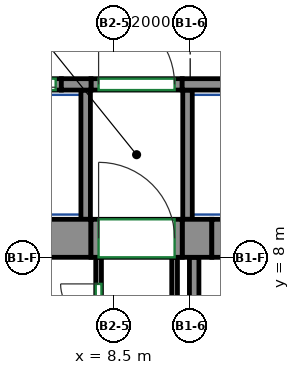
"""IFC4 building model, lengths in metres.
Left out: names, types, materials, properties, quantities, classifications, styles, units other than length and angle.
Written with IfcOpenShell. Run it as: python <this file> out.ifc"""

import sys

from ifc_helpers import new_model, si_unit, direction, frame, frame_2d, origin, place, context, subcontext, project, spatial, rectangle, extrude, source, transform, mapped, element, fill, save


model = new_model("IFC4")
c1 = context("Model", 3, precision=1e-05, world=origin(), true_north=direction((0.0, 1.0)))
c2 = subcontext(c1, "Body", "Model", "MODEL_VIEW")
j1 = project(units=[si_unit("LENGTHUNIT", "METRE"), si_unit("PLANEANGLEUNIT", "RADIAN")], contexts=[c1])
p1 = place(None, origin())
s1 = spatial("IfcSite", under=j1, at=p1, CompositionType="ELEMENT")
p2 = place(p1, origin())
s2 = spatial("IfcBuilding", under=s1, at=p2, CompositionType="ELEMENT")
p3 = place(p2, frame((0.0, 0.0, 43.0)))
s3 = spatial("IfcBuildingStorey", under=s2, at=p3, CompositionType="ELEMENT", Elevation=43.0)
m1 = source(origin(), c2, "Body", "SweptSolid", [
    extrude(rectangle(XDim=14.18, YDim=1.0, at=frame_2d((7.09, 0.0))), origin(), (0.0, 0.0, 1.0), 3.72),
])
p4 = place(p3, frame((-6.29, 8.5, 0.0), z_axis=(0.0, 0.0, 1.0), x_axis=(1.0, 0.0, 0.0)))
e1 = element("IfcWall", 1, at=p4, inside=s3, PredefinedType="SHEAR", context=c2, shape_type="MappedRepresentation", body=[
    mapped(m1, transform((0.0, 0.0, 0.0))),
])
m2 = source(origin(), c2, "Body", "SweptSolid", [
    extrude(rectangle(XDim=0.78, YDim=1.0, at=frame_2d((0.39, 0.0))), origin(), (0.0, 0.0, 1.0), 3.72),
])
p5 = place(p3, frame((10.29, 8.5, 0.0), z_axis=(0.0, 0.0, 1.0), x_axis=(1.0, 0.0, 0.0)))
e2 = element("IfcWall", 2, at=p5, inside=s3, PredefinedType="SHEAR", context=c2, shape_type="MappedRepresentation", body=[
    mapped(m2, transform((0.0, 0.0, 0.0))),
])
m3 = source(origin(), c2, "Body", "SweptSolid", [
    extrude(rectangle(XDim=0.78, YDim=0.3, at=frame_2d((0.39, 0.0))), origin(), (0.0, 0.0, 1.0), 3.72),
])
p6 = place(p3, frame((7.11, 12.55, 0.0), z_axis=(0.0, 0.0, 1.0), x_axis=(1.0, 0.0, 0.0)))
e3 = element("IfcWall", 3, at=p6, inside=s3, PredefinedType="SHEAR", context=c2, shape_type="MappedRepresentation", body=[
    mapped(m3, transform((0.0, 0.0, 0.0))),
])
m4 = source(origin(), c2, "Body", "SweptSolid", [
    extrude(rectangle(XDim=2.82, YDim=0.3, at=frame_2d((1.41, 0.0))), origin(), (0.0, 0.0, 1.0), 3.72),
])
p7 = place(p3, frame((10.29, 12.55, 0.0), z_axis=(0.0, 0.0, 1.0), x_axis=(1.0, 0.0, 0.0)))
e4 = element("IfcWall", 4, at=p7, inside=s3, PredefinedType="SHEAR", context=c2, shape_type="MappedRepresentation", body=[
    mapped(m4, transform((0.0, 0.0, 0.0))),
])
m5 = source(origin(), c2, "Body", "SweptSolid", [
    extrude(rectangle(XDim=1.4, YDim=0.3, at=frame_2d((0.7, 0.0))), origin(), (0.0, 0.0, 1.0), 3.72),
])
p8 = place(p3, frame((5.71, 12.55, 0.0), z_axis=(0.0, 0.0, 1.0), x_axis=(1.0, 0.0, 0.0)))
e5 = element("IfcWall", 5, at=p8, inside=s3, PredefinedType="PARTITIONING", context=c2, shape_type="MappedRepresentation", body=[
    mapped(m5, transform((0.0, 0.0, 0.0))),
])
p9 = place(p8, frame((0.15, 0.0, 0.0)))
e6 = element("IfcOpeningElement", 6, at=p9, cuts=e5, PredefinedType="OPENING", context=c2, shape_type="SweptSolid", body=[
    extrude(rectangle(XDim=1.1, YDim=2.1, at=frame_2d((0.55, 1.05))), frame((0.0, 0.16, 0.0), z_axis=(0.0, -1.0, 0.0), x_axis=(1.0, 0.0, 0.0)), (0.0, 0.0, 1.0), 0.32),
])
m6 = source(origin(), c2, "Body", "SweptSolid", [
    extrude(rectangle(XDim=2.4, YDim=0.3, at=frame_2d((1.2, 0.0))), origin(), (0.0, 0.0, 1.0), 3.72),
])
p10 = place(p3, frame((7.89, 12.55, 0.0), z_axis=(0.0, 0.0, 1.0), x_axis=(1.0, 0.0, 0.0)))
e7 = element("IfcWall", 7, at=p10, inside=s3, PredefinedType="PARTITIONING", context=c2, shape_type="MappedRepresentation", body=[
    mapped(m6, transform((0.0, 0.0, 0.0))),
])
p11 = place(p10, frame((0.2, 0.0, 0.0)))
e8 = element("IfcOpeningElement", 8, at=p11, cuts=e7, PredefinedType="OPENING", context=c2, shape_type="SweptSolid", body=[
    extrude(rectangle(XDim=2.0, YDim=2.1, at=frame_2d((1.0, 1.05))), frame((0.0, 0.16, 0.0), z_axis=(0.0, -1.0, 0.0), x_axis=(1.0, 0.0, 0.0)), (0.0, 0.0, 1.0), 0.32),
])
m7 = source(origin(), c2, "Body", "SweptSolid", [
    extrude(rectangle(XDim=2.65, YDim=0.25, at=frame_2d((1.325, 0.0))), origin(), (0.0, 0.0, 1.0), 3.72),
])
p12 = place(p3, frame((10.605, 5.35, 0.0), z_axis=(0.0, 0.0, 1.0), x_axis=(0.0, 1.0, 0.0)))
e9 = element("IfcWall", 9, at=p12, inside=s3, PredefinedType="PARTITIONING", context=c2, shape_type="MappedRepresentation", body=[
    mapped(m7, transform((0.0, 0.0, 0.0))),
])
m8 = source(origin(), c2, "Body", "SweptSolid", [
    extrude(rectangle(XDim=3.4, YDim=0.25, at=frame_2d((1.7, 0.0))), origin(), (0.0, 0.0, 1.0), 3.72),
])
for number, where, z_axis, x_axis in (
    (10, (10.43, 9.0, 0.0), (0.0, 0.0, 1.0), (0.0, 1.0, 0.0)),
    (11, (7.75, 9.0, 0.0), (0.0, 0.0, 1.0), (0.0, 1.0, 0.0)),
):
    element("IfcWall", number, at=place(p3, frame(where, z_axis=z_axis, x_axis=x_axis)), inside=s3, PredefinedType="PARTITIONING", context=c2, shape_type="MappedRepresentation", body=[
        mapped(m8, transform((0.0, 0.0, 0.0))),
    ])
m9 = source(origin(), c2, "Body", "SweptSolid", [
    extrude(rectangle(XDim=2.4, YDim=1.0, at=frame_2d((1.2, 0.0))), origin(), (0.0, 0.0, 1.0), 2.7),
])
p13 = place(p3, frame((7.89, 8.5, 0.0), z_axis=(0.0, 0.0, 1.0), x_axis=(1.0, 0.0, 0.0)))
e12 = element("IfcWall", 12, at=p13, inside=s3, PredefinedType="PARTITIONING", context=c2, shape_type="MappedRepresentation", body=[
    mapped(m9, transform((0.0, 0.0, 0.0))),
])
p14 = place(p13, frame((0.2, 0.0, 0.0)))
e13 = element("IfcOpeningElement", 13, at=p14, cuts=e12, PredefinedType="OPENING", context=c2, shape_type="SweptSolid", body=[
    extrude(rectangle(XDim=2.0, YDim=2.1, at=frame_2d((1.0, 1.05))), frame((0.0, 0.51, 0.0), z_axis=(0.0, -1.0, 0.0), x_axis=(1.0, 0.0, 0.0)), (0.0, 0.0, 1.0), 1.02),
])
m10 = source(origin(), c2, "Body", "SweptSolid", [
    extrude(rectangle(XDim=1.4, YDim=1.0, at=frame_2d((0.7, 0.0))), origin(), (0.0, 0.0, 1.0), 2.7),
])
p15 = place(p3, frame((11.07, 8.5, 0.0), z_axis=(0.0, 0.0, 1.0), x_axis=(1.0, 0.0, 0.0)))
e14 = element("IfcWall", 14, at=p15, inside=s3, PredefinedType="PARTITIONING", context=c2, shape_type="MappedRepresentation", body=[
    mapped(m10, transform((0.0, 0.0, 0.0))),
])
p16 = place(p15, frame((0.25, 0.0, 0.0)))
e15 = element("IfcOpeningElement", 15, at=p16, cuts=e14, PredefinedType="OPENING", context=c2, shape_type="SweptSolid", body=[
    extrude(rectangle(XDim=0.9, YDim=2.1, at=frame_2d((0.45, 1.05))), frame((0.0, 0.51, 0.0), z_axis=(0.0, -1.0, 0.0), x_axis=(1.0, 0.0, 0.0)), (0.0, 0.0, 1.0), 1.02),
])
p17 = place(p3, frame((10.09, -0.35, 0.0), z_axis=(0.0, 0.0, 1.0), x_axis=(0.0, 1.0, 0.0)))
e16 = element("IfcWall", 16, at=p17, inside=s3, PredefinedType="PARTITIONING", context=c2, shape_type="SweptSolid", body=[
    extrude(rectangle(XDim=8.35, YDim=0.15, at=frame_2d((4.175, 0.0))), origin(), (0.0, 0.0, 1.0), 3.72),
])
p18 = place(p17, frame((4.329, 0.0, 0.0)))
e17 = element("IfcOpeningElement", 17, at=p18, cuts=e16, PredefinedType="OPENING", context=c2, shape_type="SweptSolid", body=[
    extrude(rectangle(XDim=0.9, YDim=2.1, at=frame_2d((0.45, 1.05))), frame((0.0, 0.085, 0.0), z_axis=(0.0, -1.0, 0.0), x_axis=(1.0, 0.0, 0.0)), (0.0, 0.0, 1.0), 0.17),
])
p19 = place(p3, frame((8.09, 5.75, 0.0), z_axis=(0.0, 0.0, 1.0), x_axis=(0.0, 1.0, 0.0)))
e18 = element("IfcWall", 18, at=p19, inside=s3, PredefinedType="PARTITIONING", context=c2, shape_type="SweptSolid", body=[
    extrude(rectangle(XDim=2.25, YDim=0.15, at=frame_2d((1.125, 0.0))), origin(), (0.0, 0.0, 1.0), 3.72),
])
p20 = place(p19, frame((0.55, 0.0, 0.0)))
e19 = element("IfcOpeningElement", 19, at=p20, cuts=e18, PredefinedType="OPENING", context=c2, shape_type="SweptSolid", body=[
    extrude(rectangle(XDim=1.0, YDim=2.1, at=frame_2d((0.5, 1.05))), frame((0.0, 0.085, 0.0), z_axis=(0.0, -1.0, 0.0), x_axis=(1.0, 0.0, 0.0)), (0.0, 0.0, 1.0), 0.17),
])
p21 = place(p11, origin())
e20 = element("IfcDoor", 20, at=p21, inside=s3, OperationType="DOUBLE_DOOR_SINGLE_SWING", PredefinedType="DOOR", context=c2, shape_type="SweptSolid", body=[
    extrude(rectangle(XDim=2.0, YDim=2.1, at=frame_2d((1.0, 1.05))), frame((0.0, 0.025, 0.0), z_axis=(0.0, -1.0, 0.0), x_axis=(1.0, 0.0, 0.0)), (0.0, 0.0, 1.0), 0.05),
])
fill(e8, e20)
p22 = place(p14, origin())
e21 = element("IfcDoor", 21, at=p22, inside=s3, OperationType="DOUBLE_DOOR_SINGLE_SWING", PredefinedType="DOOR", context=c2, shape_type="SweptSolid", body=[
    extrude(rectangle(XDim=2.0, YDim=2.1, at=frame_2d((1.0, 1.05))), frame((0.0, 0.405, 0.0), z_axis=(0.0, -1.0, 0.0), x_axis=(1.0, 0.0, 0.0)), (0.0, 0.0, 1.0), 0.05),
])
fill(e13, e21)
p23 = place(p9, origin())
e22 = element("IfcDoor", 22, at=p23, inside=s3, OperationType="DOUBLE_DOOR_SLIDING", PredefinedType="DOOR", context=c2, shape_type="SweptSolid", body=[
    extrude(rectangle(XDim=1.1, YDim=2.1, at=frame_2d((0.55, 1.05))), frame((0.0, 0.025, 0.0), z_axis=(0.0, -1.0, 0.0), x_axis=(1.0, 0.0, 0.0)), (0.0, 0.0, 1.0), 0.05),
])
fill(e6, e22)
p24 = place(p20, origin())
e23 = element("IfcDoor", 23, at=p24, inside=s3, OperationType="SINGLE_SWING_RIGHT", PredefinedType="DOOR", context=c2, shape_type="SweptSolid", body=[
    extrude(rectangle(XDim=1.0, YDim=2.1, at=frame_2d((0.5, 1.05))), frame((0.0, 0.025, 0.0), z_axis=(0.0, -1.0, 0.0), x_axis=(1.0, 0.0, 0.0)), (0.0, 0.0, 1.0), 0.05),
])
fill(e19, e23)
save(model, sys.argv[1])
